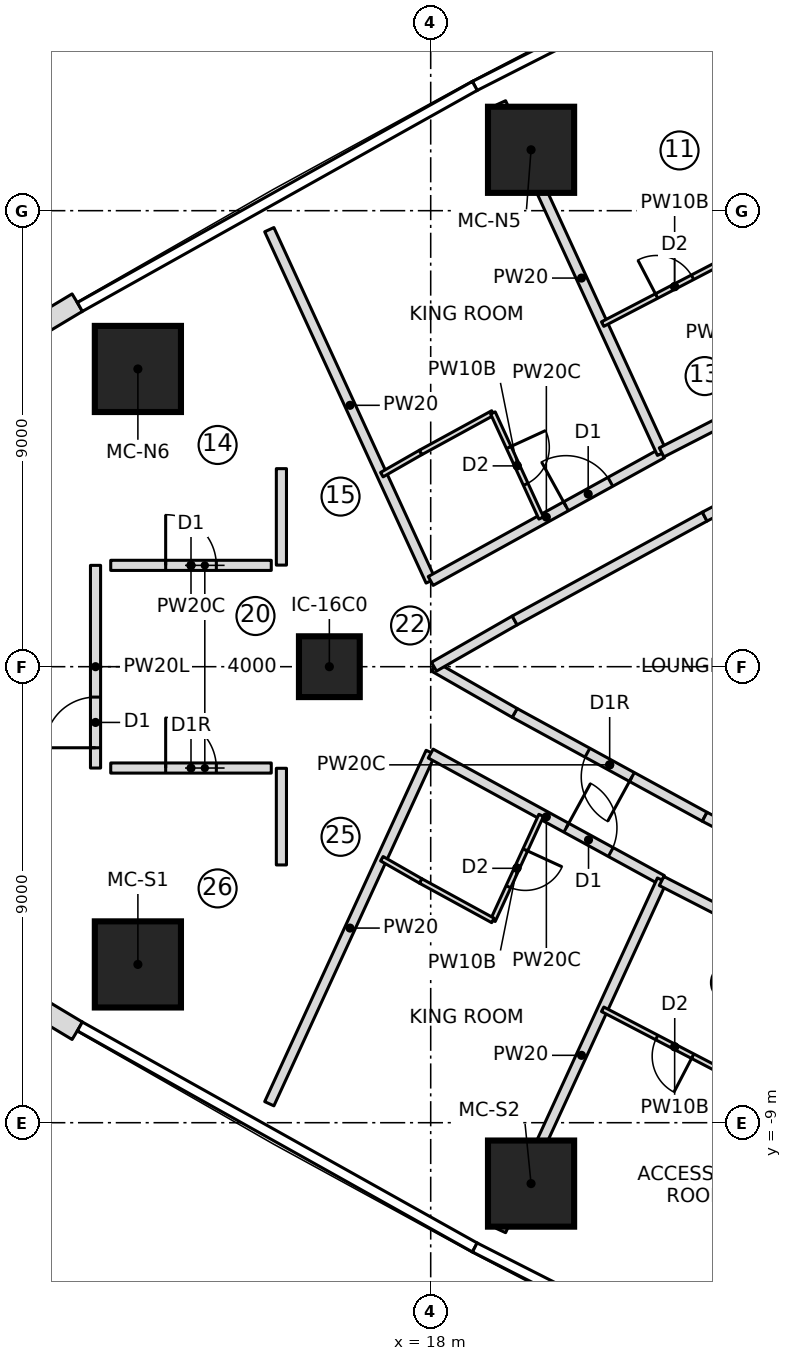
"""IFC4 building model, lengths in metres.
Left out: names, types, materials, properties, quantities, classifications, styles, units other than length and angle.
Written with IfcOpenShell. Run it as: python <this file> out.ifc"""

import sys

from ifc_helpers import new_model, si_unit, direction, frame, frame_2d, origin, origin_2d, place, context, subcontext, project, spatial, polyline, rectangle, outline, extrude, element, fill, save


model = new_model("IFC4")
c1 = context("Model", 3, precision=1e-05, world=origin(), true_north=direction((0.0, 1.0)))
c2 = subcontext(c1, "Body", "Model", "MODEL_VIEW")
j1 = project(units=[si_unit("LENGTHUNIT", "METRE"), si_unit("PLANEANGLEUNIT", "RADIAN")], contexts=[c1])
p1 = place(None, origin())
s1 = spatial("IfcSite", under=j1, at=p1, CompositionType="ELEMENT")
p2 = place(p1, origin())
s2 = spatial("IfcBuilding", under=s1, at=p2, CompositionType="ELEMENT")
p3 = place(p2, frame((0.0, 0.0, 116.85)))
s3 = spatial("IfcBuildingStorey", under=s2, at=p3, CompositionType="ELEMENT", Elevation=116.85)
for number, where, z_axis, x_axis in (
    (1, (12.221, -5.876, 0.0), (0.0, 0.0, 1.0), (1.0, 0.0, 0.0)),
    (2, (19.981, -10.202, 0.0), (0.0, 0.0, 1.0), (1.0, 0.0, 0.0)),
    (3, (19.981, 10.202, 0.0), (0.0, 0.0, 1.0), (1.0, 0.0, 0.0)),
    (4, (12.221, 5.876, 0.0), (0.0, 0.0, 1.0), (1.0, 0.0, 0.0)),
):
    element("IfcColumn", number, at=place(p3, frame(where, z_axis=z_axis, x_axis=x_axis)), inside=s3, PredefinedType="COLUMN", context=c2, shape_type="SweptSolid", body=[
        extrude(rectangle(XDim=1.7, YDim=1.7, at=origin_2d()), origin(), (0.0, 0.0, 1.0), 3.55),
    ])
p4 = place(p3, frame((16.0, 0.0, 0.0), z_axis=(0.0, 0.0, 1.0), x_axis=(1.0, 0.0, 0.0)))
e5 = element("IfcColumn", 5, at=p4, inside=s3, PredefinedType="COLUMN", context=c2, shape_type="SweptSolid", body=[
    extrude(rectangle(XDim=1.2, YDim=1.2, at=origin_2d()), origin(), (0.0, 0.0, 1.0), 3.55),
])
p5 = place(p3, frame((11.026, 7.186, 0.0), z_axis=(0.0, 0.0, 1.0), x_axis=(-0.857550776474, -0.514399325202, 0.0)))
e6 = element("IfcWall", 6, at=p5, inside=s3, PredefinedType="NOTDEFINED", context=c2, shape_type="SweptSolid", body=[
    extrude(outline(polyline([(0.0, -0.2), (4.503, -0.2), (4.433, 0.2), (0.0, 0.2), (0.0, -0.2)])), origin(), (0.0, 0.0, 1.0), 3.25),
])
p6 = place(p5, frame((1.134, 0.0, 0.6)))
e7 = element("IfcOpeningElement", 7, at=p6, cuts=e6, PredefinedType="OPENING", context=c2, shape_type="SweptSolid", body=[
    extrude(outline(polyline([(0.0, 1.35), (0.084, 1.771), (0.322, 2.128), (0.679, 2.366), (1.1, 2.45), (1.521, 2.366), (1.878, 2.128), (2.116, 1.771), (2.2, 1.35), (2.2, 1.1), (2.116, 0.679), (1.878, 0.322), (1.521, 0.084), (1.1, 0.0), (0.679, 0.084), (0.322, 0.322), (0.084, 0.679), (0.0, 1.1), (0.0, 1.35)])), frame((0.0, 0.21, 0.0), z_axis=(0.0, -1.0, 0.0), x_axis=(1.0, 0.0, 0.0)), (0.0, 0.0, 1.0), 0.42),
])
p7 = place(p3, frame((7.194, -4.888, 0.0), z_axis=(0.0, 0.0, 1.0), x_axis=(0.857550776474, -0.514399325202, 0.0)))
e8 = element("IfcWall", 8, at=p7, inside=s3, PredefinedType="NOTDEFINED", context=c2, shape_type="SweptSolid", body=[
    extrude(outline(polyline([(-0.035, -0.2), (4.468, -0.2), (4.468, 0.2), (0.035, 0.2), (-0.035, -0.2)])), origin(), (0.0, 0.0, 1.0), 3.25),
])
p8 = place(p7, frame((1.134, 0.0, 0.6)))
e9 = element("IfcOpeningElement", 9, at=p8, cuts=e8, PredefinedType="OPENING", context=c2, shape_type="SweptSolid", body=[
    extrude(outline(polyline([(0.0, 1.35), (0.084, 1.771), (0.322, 2.128), (0.679, 2.366), (1.1, 2.45), (1.521, 2.366), (1.878, 2.128), (2.116, 1.771), (2.2, 1.35), (2.2, 1.1), (2.116, 0.679), (1.878, 0.322), (1.521, 0.084), (1.1, 0.0), (0.679, 0.084), (0.322, 0.322), (0.084, 0.679), (0.0, 1.1), (0.0, 1.35)])), frame((0.0, 0.21, 0.0), z_axis=(0.0, -1.0, 0.0), x_axis=(1.0, 0.0, 0.0)), (0.0, 0.0, 1.0), 0.42),
])
p9 = place(p3, frame((11.685, 2.0, 0.0), z_axis=(0.0, 0.0, 1.0), x_axis=(1.0, 0.0, 0.0)))
e10 = element("IfcWall", 10, at=p9, inside=s3, PredefinedType="PARTITIONING", context=c2, shape_type="SweptSolid", body=[
    extrude(rectangle(XDim=3.168, YDim=0.2, at=frame_2d((1.584, 0.0))), origin(), (0.0, 0.0, 1.0), 3.15),
])
p10 = place(p9, frame((1.084, 0.0, 0.0)))
e11 = element("IfcOpeningElement", 11, at=p10, cuts=e10, PredefinedType="OPENING", context=c2, shape_type="SweptSolid", body=[
    extrude(rectangle(XDim=1.0, YDim=2.1, at=frame_2d((0.5, 1.05))), frame((0.0, 0.11, 0.0), z_axis=(0.0, -1.0, 0.0), x_axis=(1.0, 0.0, 0.0)), (0.0, 0.0, 1.0), 0.22),
])
p11 = place(p3, frame((11.685, -2.0, 0.0), z_axis=(0.0, 0.0, 1.0), x_axis=(1.0, 0.0, 0.0)))
e12 = element("IfcWall", 12, at=p11, inside=s3, PredefinedType="PARTITIONING", context=c2, shape_type="SweptSolid", body=[
    extrude(rectangle(XDim=3.168, YDim=0.2, at=frame_2d((1.584, 0.0))), origin(), (0.0, 0.0, 1.0), 3.15),
])
p12 = place(p11, frame((1.084, 0.0, 0.0)))
e13 = element("IfcOpeningElement", 13, at=p12, cuts=e12, PredefinedType="OPENING", context=c2, shape_type="SweptSolid", body=[
    extrude(rectangle(XDim=1.0, YDim=2.1, at=frame_2d((0.5, 1.05))), frame((0.0, 0.11, 0.0), z_axis=(0.0, -1.0, 0.0), x_axis=(1.0, 0.0, 0.0)), (0.0, 0.0, 1.0), 0.22),
])
p13 = place(p3, frame((11.385, -2.0, 0.0), z_axis=(0.0, 0.0, 1.0), x_axis=(0.0, 1.0, 0.0)))
e14 = element("IfcWall", 14, at=p13, inside=s3, PredefinedType="PARTITIONING", context=c2, shape_type="SweptSolid", body=[
    extrude(rectangle(XDim=4.0, YDim=0.2, at=frame_2d((2.0, 0.0))), origin(), (0.0, 0.0, 1.0), 3.15),
])
p14 = place(p13, frame((0.4, 0.0, 0.0)))
e15 = element("IfcOpeningElement", 15, at=p14, cuts=e14, PredefinedType="OPENING", context=c2, shape_type="SweptSolid", body=[
    extrude(rectangle(XDim=1.0, YDim=2.1, at=frame_2d((0.5, 1.05))), frame((0.0, 0.11, 0.0), z_axis=(0.0, -1.0, 0.0), x_axis=(1.0, 0.0, 0.0)), (0.0, 0.0, 1.0), 0.22),
])
p15 = place(p3, frame((14.815, 8.626, 0.0), z_axis=(0.0, 0.0, 1.0), x_axis=(0.417432341259, -0.908708006166, 0.0)))
e16 = element("IfcWall", 16, at=p15, inside=s3, PredefinedType="PARTITIONING", context=c2, shape_type="SweptSolid", body=[
    extrude(rectangle(XDim=7.631, YDim=0.2, at=frame_2d((3.815, 0.0))), origin(), (0.0, 0.0, 1.0), 3.15),
])
p16 = place(p3, frame((18.0, 1.692, 0.0), z_axis=(0.0, 0.0, 1.0), x_axis=(0.875501185112, 0.483215971246, 0.0)))
e17 = element("IfcWall", 17, at=p16, inside=s3, PredefinedType="PARTITIONING", context=c2, shape_type="SweptSolid", body=[
    extrude(rectangle(XDim=5.214, YDim=0.2, at=frame_2d((2.607, 0.0))), origin(), (0.0, 0.0, 1.0), 3.15),
])
p17 = place(p16, frame((3.05, 0.0, 0.0)))
e18 = element("IfcOpeningElement", 18, at=p17, cuts=e17, PredefinedType="OPENING", context=c2, shape_type="SweptSolid", body=[
    extrude(rectangle(XDim=1.0, YDim=2.1, at=frame_2d((0.5, 1.05))), frame((0.0, 0.11, 0.0), z_axis=(0.0, -1.0, 0.0), x_axis=(1.0, 0.0, 0.0)), (0.0, 0.0, 1.0), 0.22),
])
p18 = place(p3, frame((17.036, 3.79, 0.0), z_axis=(0.0, 0.0, 1.0), x_axis=(0.867629162742, 0.497211862248, 0.0)))
e19 = element("IfcWall", 19, at=p18, inside=s3, PredefinedType="PARTITIONING", context=c2, shape_type="SweptSolid", body=[
    extrude(rectangle(XDim=0.882, YDim=0.1, at=frame_2d((0.441, 0.0))), origin(), (0.0, 0.0, 1.0), 3.15),
])
p19 = place(p3, frame((17.801, 4.229, 0.0), z_axis=(0.0, 0.0, 1.0), x_axis=(0.877424481957, 0.479714788663, 0.0)))
e20 = element("IfcWall", 20, at=p19, inside=s3, PredefinedType="PARTITIONING", context=c2, shape_type="SweptSolid", body=[
    extrude(rectangle(XDim=1.625, YDim=0.1, at=frame_2d((0.813, 0.0))), origin(), (0.0, 0.0, 1.0), 3.15),
])
p20 = place(p3, frame((19.228, 5.008, 0.0), z_axis=(0.0, 0.0, 1.0), x_axis=(0.417450047292, -0.908699872354, 0.0)))
e21 = element("IfcWall", 21, at=p20, inside=s3, PredefinedType="PARTITIONING", context=c2, shape_type="SweptSolid", body=[
    extrude(rectangle(XDim=2.283, YDim=0.1, at=frame_2d((1.141, 0.0))), origin(), (0.0, 0.0, 1.0), 3.15),
])
p21 = place(p20, frame((0.75, 0.0, 0.0)))
e22 = element("IfcOpeningElement", 22, at=p21, cuts=e21, PredefinedType="OPENING", context=c2, shape_type="SweptSolid", body=[
    extrude(rectangle(XDim=0.8, YDim=2.1, at=frame_2d((0.4, 1.05))), frame((0.0, 0.06, 0.0), z_axis=(0.0, -1.0, 0.0), x_axis=(1.0, 0.0, 0.0)), (0.0, 0.0, 1.0), 0.12),
])
p22 = place(p3, frame((22.565, 4.211, 0.0), z_axis=(0.0, 0.0, 1.0), x_axis=(-0.41742645501, 0.908710710104, 0.0)))
e23 = element("IfcWall", 23, at=p22, inside=s3, PredefinedType="PARTITIONING", context=c2, shape_type="SweptSolid", body=[
    extrude(rectangle(XDim=7.613, YDim=0.2, at=frame_2d((3.806, 0.0))), origin(), (0.0, 0.0, 1.0), 3.15),
])
p23 = place(p3, frame((22.557, 4.229, 0.0), z_axis=(0.0, 0.0, 1.0), x_axis=(0.889706581948, 0.456532800617, 0.0)))
e24 = element("IfcWall", 24, at=p23, inside=s3, PredefinedType="PARTITIONING", context=c2, shape_type="SweptSolid", body=[
    extrude(rectangle(XDim=5.205, YDim=0.2, at=frame_2d((2.603, 0.0))), origin(), (0.0, 0.0, 1.0), 3.15),
])
p24 = place(p23, frame((3.7, 0.0, 0.0)))
e25 = element("IfcOpeningElement", 25, at=p24, cuts=e24, PredefinedType="OPENING", context=c2, shape_type="SweptSolid", body=[
    extrude(rectangle(XDim=1.0, YDim=2.1, at=frame_2d((0.5, 1.05))), frame((0.0, 0.11, 0.0), z_axis=(0.0, -1.0, 0.0), x_axis=(1.0, 0.0, 0.0)), (0.0, 0.0, 1.0), 0.22),
])
p25 = place(p3, frame((21.394, 6.762, 0.0), z_axis=(0.0, 0.0, 1.0), x_axis=(0.886897171809, 0.461966889114, 0.0)))
e26 = element("IfcWall", 26, at=p25, inside=s3, PredefinedType="PARTITIONING", context=c2, shape_type="SweptSolid", body=[
    extrude(rectangle(XDim=3.204, YDim=0.1, at=frame_2d((1.602, 0.0))), origin(), (0.0, 0.0, 1.0), 3.15),
])
p26 = place(p25, frame((1.2, 0.0, 0.0)))
e27 = element("IfcOpeningElement", 27, at=p26, cuts=e26, PredefinedType="OPENING", context=c2, shape_type="SweptSolid", body=[
    extrude(rectangle(XDim=0.8, YDim=2.1, at=frame_2d((0.4, 1.05))), frame((0.0, 0.06, 0.0), z_axis=(0.0, -1.0, 0.0), x_axis=(1.0, 0.0, 0.0)), (0.0, 0.0, 1.0), 0.12),
])
p27 = place(p3, frame((14.815, -8.626, 0.0), z_axis=(0.0, 0.0, 1.0), x_axis=(0.417432341259, 0.908708006166, 0.0)))
e28 = element("IfcWall", 28, at=p27, inside=s3, PredefinedType="PARTITIONING", context=c2, shape_type="SweptSolid", body=[
    extrude(rectangle(XDim=7.631, YDim=0.2, at=frame_2d((3.815, 0.0))), origin(), (0.0, 0.0, 1.0), 3.15),
])
p28 = place(p3, frame((18.0, -1.715, 0.0), z_axis=(0.0, 0.0, 1.0), x_axis=(0.877360645448, -0.479831530664, 0.0)))
e29 = element("IfcWall", 29, at=p28, inside=s3, PredefinedType="PARTITIONING", context=c2, shape_type="SweptSolid", body=[
    extrude(rectangle(XDim=5.203, YDim=0.2, at=frame_2d((2.602, 0.0))), origin(), (0.0, 0.0, 1.0), 3.15),
])
p29 = place(p28, frame((3.05, 0.0, 0.0)))
e30 = element("IfcOpeningElement", 30, at=p29, cuts=e29, PredefinedType="OPENING", context=c2, shape_type="SweptSolid", body=[
    extrude(rectangle(XDim=1.0, YDim=2.1, at=frame_2d((0.5, 1.05))), frame((0.0, 0.11, 0.0), z_axis=(0.0, -1.0, 0.0), x_axis=(1.0, 0.0, 0.0)), (0.0, 0.0, 1.0), 0.22),
])
p30 = place(p3, frame((20.18, -2.934, 0.0), z_axis=(0.0, 0.0, 1.0), x_axis=(-0.417450047292, -0.908699872354, 0.0)))
e31 = element("IfcWall", 31, at=p30, inside=s3, PredefinedType="PARTITIONING", context=c2, shape_type="SweptSolid", body=[
    extrude(rectangle(XDim=2.283, YDim=0.1, at=frame_2d((1.141, 0.0))), origin(), (0.0, 0.0, 1.0), 3.15),
])
p31 = place(p30, frame((0.75, 0.0, 0.0)))
e32 = element("IfcOpeningElement", 32, at=p31, cuts=e31, PredefinedType="OPENING", context=c2, shape_type="SweptSolid", body=[
    extrude(rectangle(XDim=0.8, YDim=2.1, at=frame_2d((0.4, 1.05))), frame((0.0, 0.06, 0.0), z_axis=(0.0, -1.0, 0.0), x_axis=(1.0, 0.0, 0.0)), (0.0, 0.0, 1.0), 0.12),
])
p32 = place(p3, frame((19.228, -5.008, 0.0), z_axis=(0.0, 0.0, 1.0), x_axis=(-0.877424481957, 0.479714788663, 0.0)))
e33 = element("IfcWall", 33, at=p32, inside=s3, PredefinedType="PARTITIONING", context=c2, shape_type="SweptSolid", body=[
    extrude(rectangle(XDim=1.625, YDim=0.1, at=frame_2d((0.813, 0.0))), origin(), (0.0, 0.0, 1.0), 3.15),
])
p33 = place(p3, frame((17.801, -4.229, 0.0), z_axis=(0.0, 0.0, 1.0), x_axis=(-0.867629162742, 0.497211862248, 0.0)))
e34 = element("IfcWall", 34, at=p33, inside=s3, PredefinedType="PARTITIONING", context=c2, shape_type="SweptSolid", body=[
    extrude(rectangle(XDim=0.882, YDim=0.1, at=frame_2d((0.441, 0.0))), origin(), (0.0, 0.0, 1.0), 3.15),
])
p34 = place(p3, frame((19.387, -11.129, 0.0), z_axis=(0.0, 0.0, 1.0), x_axis=(0.41742645501, 0.908710710104, 0.0)))
e35 = element("IfcWall", 35, at=p34, inside=s3, PredefinedType="PARTITIONING", context=c2, shape_type="SweptSolid", body=[
    extrude(rectangle(XDim=7.613, YDim=0.2, at=frame_2d((3.806, 0.0))), origin(), (0.0, 0.0, 1.0), 3.15),
])
p35 = place(p3, frame((22.557, -4.229, 0.0), z_axis=(0.0, 0.0, 1.0), x_axis=(0.889706581948, -0.456532800617, 0.0)))
e36 = element("IfcWall", 36, at=p35, inside=s3, PredefinedType="PARTITIONING", context=c2, shape_type="SweptSolid", body=[
    extrude(rectangle(XDim=5.205, YDim=0.2, at=frame_2d((2.603, 0.0))), origin(), (0.0, 0.0, 1.0), 3.15),
])
p36 = place(p35, frame((3.7, 0.0, 0.0)))
e37 = element("IfcOpeningElement", 37, at=p36, cuts=e36, PredefinedType="OPENING", context=c2, shape_type="SweptSolid", body=[
    extrude(rectangle(XDim=1.0, YDim=2.1, at=frame_2d((0.5, 1.05))), frame((0.0, 0.11, 0.0), z_axis=(0.0, -1.0, 0.0), x_axis=(1.0, 0.0, 0.0)), (0.0, 0.0, 1.0), 0.22),
])
p37 = place(p3, frame((24.235, -8.242, 0.0), z_axis=(0.0, 0.0, 1.0), x_axis=(-0.886897171809, 0.461966889114, 0.0)))
e38 = element("IfcWall", 38, at=p37, inside=s3, PredefinedType="PARTITIONING", context=c2, shape_type="SweptSolid", body=[
    extrude(rectangle(XDim=3.204, YDim=0.1, at=frame_2d((1.602, 0.0))), origin(), (0.0, 0.0, 1.0), 3.15),
])
p38 = place(p37, frame((1.2, 0.0, 0.0)))
e39 = element("IfcOpeningElement", 39, at=p38, cuts=e38, PredefinedType="OPENING", context=c2, shape_type="SweptSolid", body=[
    extrude(rectangle(XDim=0.8, YDim=2.1, at=frame_2d((0.4, 1.05))), frame((0.0, 0.06, 0.0), z_axis=(0.0, -1.0, 0.0), x_axis=(1.0, 0.0, 0.0)), (0.0, 0.0, 1.0), 0.12),
])
p39 = place(p3, frame((23.407, -2.962, 0.0), z_axis=(0.0, 0.0, 1.0), x_axis=(-0.877465075585, 0.479640533242, 0.0)))
e40 = element("IfcWall", 40, at=p39, inside=s3, PredefinedType="PARTITIONING", context=c2, shape_type="SweptSolid", body=[
    extrude(rectangle(XDim=4.273, YDim=0.2, at=frame_2d((2.137, 0.0))), origin(), (0.0, 0.0, 1.0), 3.15),
])
p40 = place(p39, frame((1.636, 0.0, 0.0)))
e41 = element("IfcOpeningElement", 41, at=p40, cuts=e40, PredefinedType="OPENING", context=c2, shape_type="SweptSolid", body=[
    extrude(rectangle(XDim=1.0, YDim=2.1, at=frame_2d((0.5, 1.05))), frame((0.0, 0.11, 0.0), z_axis=(0.0, -1.0, 0.0), x_axis=(1.0, 0.0, 0.0)), (0.0, 0.0, 1.0), 0.22),
])
for number, where, z_axis, x_axis in (
    (42, (19.657, -0.912, 0.0), (0.0, 0.0, 1.0), (-0.868, 0.497, 0.0)),
    (43, (18.065, 0.0, 0.0), (0.0, 0.0, 1.0), (0.868, 0.497, 0.0)),
):
    element("IfcWall", number, at=place(p3, frame(where, z_axis=z_axis, x_axis=x_axis)), inside=s3, PredefinedType="PARTITIONING", context=c2, shape_type="SweptSolid", body=[
        extrude(rectangle(XDim=1.835, YDim=0.2, at=frame_2d((0.918, 0.0))), origin(), (0.0, 0.0, 1.0), 3.15),
    ])
p41 = place(p3, frame((19.657, 0.912, 0.0), z_axis=(0.0, 0.0, 1.0), x_axis=(0.877465075585, 0.479640533242, 0.0)))
e44 = element("IfcWall", 44, at=p41, inside=s3, PredefinedType="PARTITIONING", context=c2, shape_type="SweptSolid", body=[
    extrude(rectangle(XDim=4.273, YDim=0.2, at=frame_2d((2.137, 0.0))), origin(), (0.0, 0.0, 1.0), 3.15),
])
for number, where, z_axis, x_axis in (
    (45, (23.407, 2.962, 0.0), (0.0, 0.0, 1.0), (0.887, 0.462, 0.0)),
    (46, (26.308, -4.473, 0.0), (0.0, 0.0, 1.0), (-0.887, 0.462, 0.0)),
):
    element("IfcWall", number, at=place(p3, frame(where, z_axis=z_axis, x_axis=x_axis)), inside=s3, PredefinedType="PARTITIONING", context=c2, shape_type="SweptSolid", body=[
        extrude(rectangle(XDim=3.271, YDim=0.2, at=frame_2d((1.636, 0.0))), origin(), (0.0, 0.0, 1.0), 3.15),
    ])
p42 = place(p3, frame((15.054, 3.909, 0.0), z_axis=(0.0, 0.0, 1.0), x_axis=(0.0, -1.0, 0.0)))
e47 = element("IfcWall", 47, at=p42, inside=s3, PredefinedType="PARTITIONING", context=c2, shape_type="SweptSolid", body=[
    extrude(rectangle(XDim=1.904, YDim=0.2, at=frame_2d((0.952, 0.0))), origin(), (0.0, 0.0, 1.0), 3.15),
])
p43 = place(p3, frame((15.054, -2.005, 0.0), z_axis=(0.0, 0.0, 1.0), x_axis=(0.0, -1.0, 0.0)))
e48 = element("IfcWall", 48, at=p43, inside=s3, PredefinedType="PARTITIONING", context=c2, shape_type="SweptSolid", body=[
    extrude(rectangle(XDim=1.908, YDim=0.2, at=frame_2d((0.954, 0.0))), origin(), (0.0, 0.0, 1.0), 3.15),
])
p44 = place(p10, origin())
e49 = element("IfcDoor", 49, at=p44, inside=s3, OperationType="SINGLE_SWING_LEFT", PredefinedType="DOOR", context=c2, shape_type="SweptSolid", body=[
    extrude(rectangle(XDim=1.0, YDim=2.1, at=frame_2d((0.5, 1.05))), frame((0.0, 0.025, 0.0), z_axis=(0.0, -1.0, 0.0), x_axis=(1.0, 0.0, 0.0)), (0.0, 0.0, 1.0), 0.05),
])
fill(e11, e49)
p45 = place(p12, origin())
e50 = element("IfcDoor", 50, at=p45, inside=s3, OperationType="SINGLE_SWING_RIGHT", PredefinedType="DOOR", context=c2, shape_type="SweptSolid", body=[
    extrude(rectangle(XDim=1.0, YDim=2.1, at=frame_2d((0.5, 1.05))), frame((0.0, 0.025, 0.0), z_axis=(0.0, -1.0, 0.0), x_axis=(1.0, 0.0, 0.0)), (0.0, 0.0, 1.0), 0.05),
])
fill(e13, e50)
p46 = place(p14, origin())
e51 = element("IfcDoor", 51, at=p46, inside=s3, OperationType="SINGLE_SWING_LEFT", PredefinedType="DOOR", context=c2, shape_type="SweptSolid", body=[
    extrude(rectangle(XDim=1.0, YDim=2.1, at=frame_2d((0.5, 1.05))), frame((0.0, 0.025, 0.0), z_axis=(0.0, -1.0, 0.0), x_axis=(1.0, 0.0, 0.0)), (0.0, 0.0, 1.0), 0.05),
])
fill(e15, e51)
p47 = place(p21, origin())
e52 = element("IfcDoor", 52, at=p47, inside=s3, OperationType="SINGLE_SWING_LEFT", PredefinedType="DOOR", context=c2, shape_type="SweptSolid", body=[
    extrude(rectangle(XDim=0.8, YDim=2.1, at=frame_2d((0.4, 1.05))), frame((0.0, 0.025, 0.0), z_axis=(0.0, -1.0, 0.0), x_axis=(1.0, 0.0, 0.0)), (0.0, 0.0, 1.0), 0.05),
])
fill(e22, e52)
p48 = place(p17, origin())
e53 = element("IfcDoor", 53, at=p48, inside=s3, OperationType="SINGLE_SWING_LEFT", PredefinedType="DOOR", context=c2, shape_type="SweptSolid", body=[
    extrude(rectangle(XDim=1.0, YDim=2.1, at=frame_2d((0.5, 1.05))), frame((0.0, 0.025, 0.0), z_axis=(0.0, -1.0, 0.0), x_axis=(1.0, 0.0, 0.0)), (0.0, 0.0, 1.0), 0.05),
])
fill(e18, e53)
p49 = place(p26, origin())
e54 = element("IfcDoor", 54, at=p49, inside=s3, OperationType="SINGLE_SWING_LEFT", PredefinedType="DOOR", context=c2, shape_type="SweptSolid", body=[
    extrude(rectangle(XDim=0.8, YDim=2.1, at=frame_2d((0.4, 1.05))), frame((0.0, 0.025, 0.0), z_axis=(0.0, -1.0, 0.0), x_axis=(1.0, 0.0, 0.0)), (0.0, 0.0, 1.0), 0.05),
])
fill(e27, e54)
p50 = place(p31, origin())
e55 = element("IfcDoor", 55, at=p50, inside=s3, OperationType="SINGLE_SWING_LEFT", PredefinedType="DOOR", context=c2, shape_type="SweptSolid", body=[
    extrude(rectangle(XDim=0.8, YDim=2.1, at=frame_2d((0.4, 1.05))), frame((0.0, 0.025, 0.0), z_axis=(0.0, -1.0, 0.0), x_axis=(1.0, 0.0, 0.0)), (0.0, 0.0, 1.0), 0.05),
])
fill(e32, e55)
p51 = place(p29, origin())
e56 = element("IfcDoor", 56, at=p51, inside=s3, OperationType="SINGLE_SWING_LEFT", PredefinedType="DOOR", context=c2, shape_type="SweptSolid", body=[
    extrude(rectangle(XDim=1.0, YDim=2.1, at=frame_2d((0.5, 1.05))), frame((0.0, 0.025, 0.0), z_axis=(0.0, -1.0, 0.0), x_axis=(1.0, 0.0, 0.0)), (0.0, 0.0, 1.0), 0.05),
])
fill(e30, e56)
p52 = place(p38, origin())
e57 = element("IfcDoor", 57, at=p52, inside=s3, OperationType="SINGLE_SWING_LEFT", PredefinedType="DOOR", context=c2, shape_type="SweptSolid", body=[
    extrude(rectangle(XDim=0.8, YDim=2.1, at=frame_2d((0.4, 1.05))), frame((0.0, 0.025, 0.0), z_axis=(0.0, -1.0, 0.0), x_axis=(1.0, 0.0, 0.0)), (0.0, 0.0, 1.0), 0.05),
])
fill(e39, e57)
p53 = place(p40, origin())
e58 = element("IfcDoor", 58, at=p53, inside=s3, OperationType="SINGLE_SWING_RIGHT", PredefinedType="DOOR", context=c2, shape_type="SweptSolid", body=[
    extrude(rectangle(XDim=1.0, YDim=2.1, at=frame_2d((0.5, 1.05))), frame((0.0, 0.025, 0.0), z_axis=(0.0, -1.0, 0.0), x_axis=(1.0, 0.0, 0.0)), (0.0, 0.0, 1.0), 0.05),
])
fill(e41, e58)
save(model, sys.argv[1])
